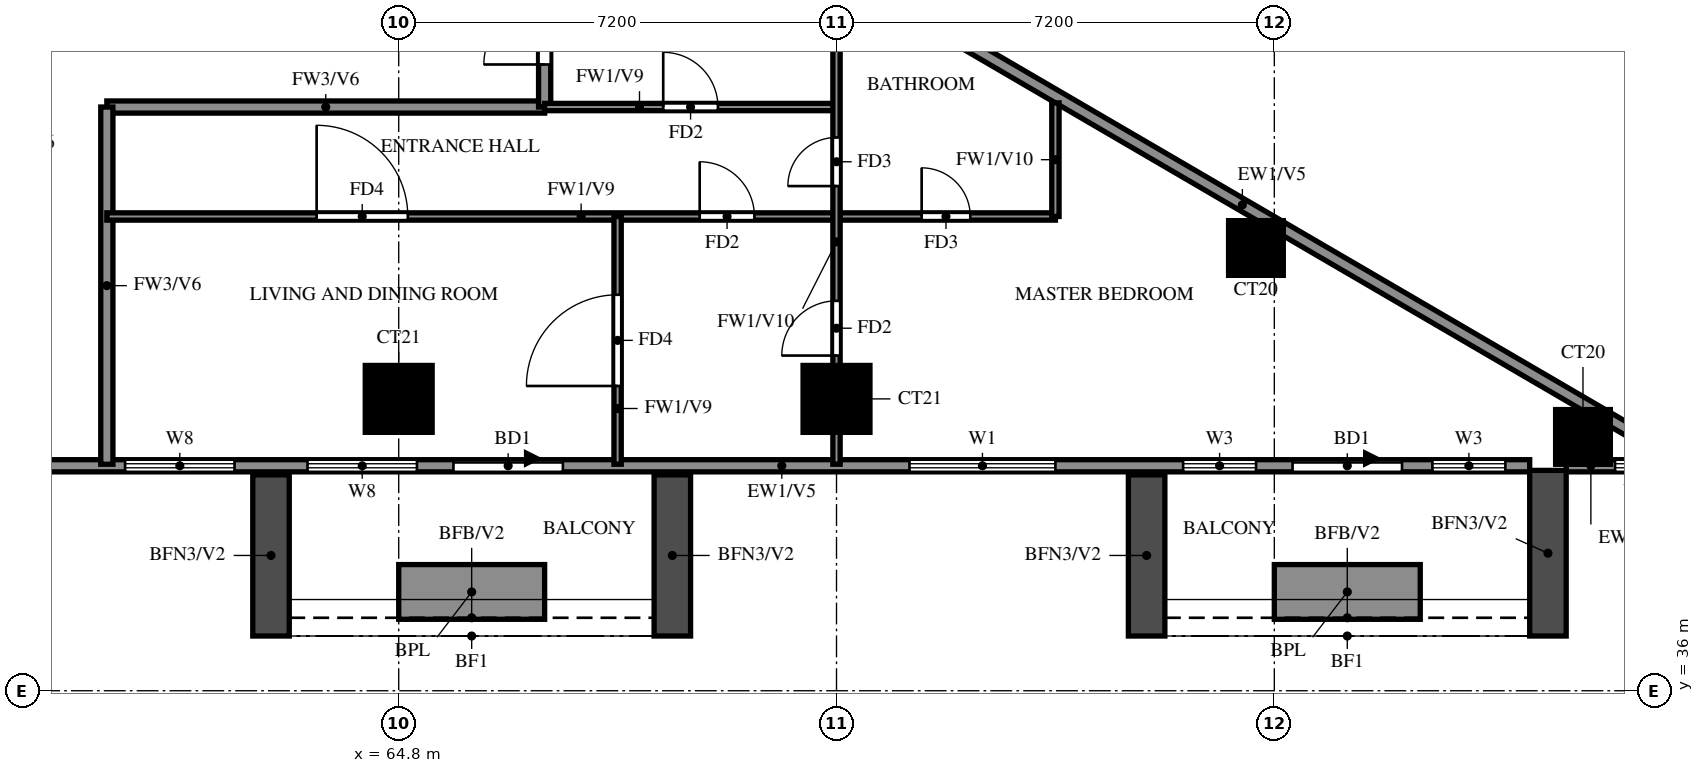
"""IFC4 building model, lengths in metres.
Left out: names, types, materials, properties, quantities, classifications, styles, units other than length and angle.
Written with IfcOpenShell. Run it as: python <this file> out.ifc"""

import sys

from ifc_helpers import new_model, si_unit, direction, frame, frame_2d, origin, origin_2d, place, context, subcontext, project, spatial, rectangle, extrude, source, transform, mapped, element, fill, save


model = new_model("IFC4")
c1 = context("Model", 3, precision=1e-05, world=origin(), true_north=direction((0.0, 1.0)))
c2 = subcontext(c1, "Body", "Model", "MODEL_VIEW")
j1 = project(units=[si_unit("LENGTHUNIT", "METRE"), si_unit("PLANEANGLEUNIT", "RADIAN")], contexts=[c1])
p1 = place(None, origin())
s1 = spatial("IfcSite", under=j1, at=p1, CompositionType="ELEMENT")
p2 = place(p1, origin())
s2 = spatial("IfcBuilding", under=s1, at=p2, CompositionType="ELEMENT")
p3 = place(p2, frame((0.0, 0.0, 134.0)))
s3 = spatial("IfcBuildingStorey", under=s2, at=p3, CompositionType="ELEMENT", Elevation=134.0)
m1 = source(origin(), c2, "Body", "SweptSolid", [
    extrude(rectangle(XDim=0.9, YDim=0.9, at=origin_2d()), origin(), (0.0, 0.0, 1.0), 3.15),
])
p4 = place(p3, frame((84.276, 40.174, 0.0), z_axis=(0.0, 0.0, 1.0), x_axis=(1.0, 0.0, 0.0)))
e1 = element("IfcColumn", 1, at=p4, inside=s3, PredefinedType="COLUMN", context=c2, shape_type="MappedRepresentation", body=[
    mapped(m1, transform((0.0, 0.0, 0.0))),
])
m2 = source(origin(), c2, "Body", "SweptSolid", [
    extrude(rectangle(XDim=1.1, YDim=1.1, at=origin_2d()), origin(), (0.0, 0.0, 1.0), 3.15),
])
for number, where, z_axis, x_axis in (
    (2, (64.8, 40.8, 0.0), (0.0, 0.0, 1.0), (1.0, 0.0, 0.0)),
    (3, (72.0, 40.8, 0.0), (0.0, 0.0, 1.0), (1.0, 0.0, 0.0)),
):
    element("IfcColumn", number, at=place(p3, frame(where, z_axis=z_axis, x_axis=x_axis)), inside=s3, PredefinedType="COLUMN", context=c2, shape_type="MappedRepresentation", body=[
        mapped(m2, transform((0.0, 0.0, 0.0))),
    ])
p5 = place(p3, frame((78.898, 43.282, 0.0), z_axis=(0.0, 0.0, 1.0), x_axis=(1.0, 0.0, 0.0)))
e4 = element("IfcColumn", 4, at=p5, inside=s3, PredefinedType="COLUMN", context=c2, shape_type="MappedRepresentation", body=[
    mapped(m1, transform((0.0, 0.0, 0.0))),
])
p6 = place(p3, frame((85.719, 39.881, 0.0), z_axis=(0.0, 0.0, 1.0), x_axis=(-0.86377618652, 0.503875678716, 0.0)))
e5 = element("IfcWall", 5, at=p6, inside=s3, PredefinedType="SOLIDWALL", context=c2, shape_type="SweptSolid", body=[
    extrude(rectangle(XDim=16.311, YDim=0.2, at=frame_2d((8.156, 0.0))), origin(), (0.0, 0.0, 1.0), 3.15),
])
p7 = place(p6, frame((13.326, 0.0, 1.5)))
e6 = element("IfcOpeningElement", 6, at=p7, cuts=e5, PredefinedType="OPENING", context=c2, shape_type="SweptSolid", body=[
    extrude(rectangle(XDim=0.9, YDim=0.9, at=frame_2d((0.45, 0.45))), frame((0.0, 0.11, 0.0), z_axis=(0.0, -1.0, 0.0), x_axis=(1.0, 0.0, 0.0)), (0.0, 0.0, 1.0), 0.22),
])
p8 = place(p3, frame((58.8, 39.7, 0.0), z_axis=(0.0, 0.0, 1.0), x_axis=(1.0, 0.0, 0.0)))
e7 = element("IfcWall", 7, at=p8, inside=s3, PredefinedType="SOLIDWALL", context=c2, shape_type="SweptSolid", body=[
    extrude(rectangle(XDim=24.6, YDim=0.2, at=frame_2d((12.3, 0.0))), origin(), (0.0, 0.0, 1.0), 3.15),
])
p9 = place(p8, frame((6.9, 0.0, 0.0)))
e8 = element("IfcOpeningElement", 8, at=p9, cuts=e7, PredefinedType="OPENING", context=c2, shape_type="SweptSolid", body=[
    extrude(rectangle(XDim=1.8, YDim=2.4, at=frame_2d((0.9, 1.2))), frame((0.0, 0.11, 0.0), z_axis=(0.0, -1.0, 0.0), x_axis=(1.0, 0.0, 0.0)), (0.0, 0.0, 1.0), 0.22),
])
p10 = place(p8, frame((20.7, 0.0, 0.0)))
e9 = element("IfcOpeningElement", 9, at=p10, cuts=e7, PredefinedType="OPENING", context=c2, shape_type="SweptSolid", body=[
    extrude(rectangle(XDim=1.8, YDim=2.4, at=frame_2d((0.9, 1.2))), frame((0.0, 0.11, 0.0), z_axis=(0.0, -1.0, 0.0), x_axis=(1.0, 0.0, 0.0)), (0.0, 0.0, 1.0), 0.22),
])
p11 = place(p8, frame((1.5, 0.0, 0.6)))
e10 = element("IfcOpeningElement", 10, at=p11, cuts=e7, PredefinedType="OPENING", context=c2, shape_type="SweptSolid", body=[
    extrude(rectangle(XDim=1.8, YDim=2.4, at=frame_2d((0.9, 1.2))), frame((0.0, 0.11, 0.0), z_axis=(0.0, -1.0, 0.0), x_axis=(1.0, 0.0, 0.0)), (0.0, 0.0, 1.0), 0.22),
])
p12 = place(p8, frame((4.5, 0.0, 0.6)))
e11 = element("IfcOpeningElement", 11, at=p12, cuts=e7, PredefinedType="OPENING", context=c2, shape_type="SweptSolid", body=[
    extrude(rectangle(XDim=1.8, YDim=2.4, at=frame_2d((0.9, 1.2))), frame((0.0, 0.11, 0.0), z_axis=(0.0, -1.0, 0.0), x_axis=(1.0, 0.0, 0.0)), (0.0, 0.0, 1.0), 0.22),
])
p13 = place(p8, frame((14.4, 0.0, 0.6)))
e12 = element("IfcOpeningElement", 12, at=p13, cuts=e7, PredefinedType="OPENING", context=c2, shape_type="SweptSolid", body=[
    extrude(rectangle(XDim=2.4, YDim=2.4, at=frame_2d((1.2, 1.2))), frame((0.0, 0.11, 0.0), z_axis=(0.0, -1.0, 0.0), x_axis=(1.0, 0.0, 0.0)), (0.0, 0.0, 1.0), 0.22),
])
p14 = place(p8, frame((18.9, 0.0, 0.6)))
e13 = element("IfcOpeningElement", 13, at=p14, cuts=e7, PredefinedType="OPENING", context=c2, shape_type="SweptSolid", body=[
    extrude(rectangle(XDim=1.2, YDim=2.4, at=frame_2d((0.6, 1.2))), frame((0.0, 0.11, 0.0), z_axis=(0.0, -1.0, 0.0), x_axis=(1.0, 0.0, 0.0)), (0.0, 0.0, 1.0), 0.22),
])
p15 = place(p8, frame((23.0, 0.0, 0.6)))
e14 = element("IfcOpeningElement", 14, at=p15, cuts=e7, PredefinedType="OPENING", context=c2, shape_type="SweptSolid", body=[
    extrude(rectangle(XDim=1.2, YDim=2.4, at=frame_2d((0.6, 1.2))), frame((0.0, 0.11, 0.0), z_axis=(0.0, -1.0, 0.0), x_axis=(1.0, 0.0, 0.0)), (0.0, 0.0, 1.0), 0.22),
])
p16 = place(p3, frame((84.0, 39.7, 0.0), z_axis=(0.0, 0.0, 1.0), x_axis=(1.0, 0.0, 0.0)))
e15 = element("IfcWall", 15, at=p16, inside=s3, PredefinedType="SOLIDWALL", context=c2, shape_type="SweptSolid", body=[
    extrude(rectangle(XDim=2.03, YDim=0.2, at=frame_2d((1.015, 0.0))), origin(), (0.0, 0.0, 1.0), 3.15),
])
p17 = place(p16, frame((0.803, 0.0, 0.6)))
e16 = element("IfcOpeningElement", 16, at=p17, cuts=e15, PredefinedType="OPENING", context=c2, shape_type="SweptSolid", body=[
    extrude(rectangle(XDim=0.9, YDim=2.4, at=frame_2d((0.45, 1.2))), frame((0.0, 0.11, 0.0), z_axis=(0.0, -1.0, 0.0), x_axis=(1.0, 0.0, 0.0)), (0.0, 0.0, 1.0), 0.22),
])
for number, where, z_axis, x_axis in (
    (17, (62.7, 39.55, 0.0), (0.0, 0.0, 1.0), (0.0, -1.0, 0.0)),
    (18, (69.3, 39.55, 0.0), (0.0, 0.0, 1.0), (0.0, -1.0, 0.0)),
):
    element("IfcWall", number, at=place(p3, frame(where, z_axis=z_axis, x_axis=x_axis)), inside=s3, PredefinedType="SOLIDWALL", context=c2, shape_type="SweptSolid", body=[
        extrude(rectangle(XDim=2.65, YDim=0.6, at=frame_2d((1.325, 0.0))), origin(), (0.0, 0.0, 1.0), 2.8),
    ])
p18 = place(p3, frame((64.8, 37.625, 0.0), z_axis=(0.0, 0.0, 1.0), x_axis=(1.0, 0.0, 0.0)))
e19 = element("IfcWall", 19, at=p18, inside=s3, PredefinedType="SOLIDWALL", context=c2, shape_type="SweptSolid", body=[
    extrude(rectangle(XDim=2.4, YDim=0.9, at=frame_2d((1.2, 0.0))), origin(), (0.0, 0.0, 1.0), 0.9),
])
p19 = place(p3, frame((77.1, 39.55, 0.0), z_axis=(0.0, 0.0, 1.0), x_axis=(0.0, -1.0, 0.0)))
e20 = element("IfcWall", 20, at=p19, inside=s3, PredefinedType="SOLIDWALL", context=c2, shape_type="SweptSolid", body=[
    extrude(rectangle(XDim=2.65, YDim=0.6, at=frame_2d((1.325, 0.0))), origin(), (0.0, 0.0, 1.0), 2.8),
])
p20 = place(p3, frame((83.7, 39.624, 0.0), z_axis=(0.0, 0.0, 1.0), x_axis=(0.0, -1.0, 0.0)))
e21 = element("IfcWall", 21, at=p20, inside=s3, PredefinedType="SOLIDWALL", context=c2, shape_type="SweptSolid", body=[
    extrude(rectangle(XDim=2.724, YDim=0.6, at=frame_2d((1.362, 0.0))), origin(), (0.0, 0.0, 1.0), 2.8),
])
p21 = place(p3, frame((79.2, 37.625, 0.0), z_axis=(0.0, 0.0, 1.0), x_axis=(1.0, 0.0, 0.0)))
e22 = element("IfcWall", 22, at=p21, inside=s3, PredefinedType="SOLIDWALL", context=c2, shape_type="SweptSolid", body=[
    extrude(rectangle(XDim=2.4, YDim=0.9, at=frame_2d((1.2, 0.0))), origin(), (0.0, 0.0, 1.0), 0.9),
])
p22 = place(p3, frame((60.0, 45.6, 0.0), z_axis=(0.0, 0.0, 1.0), x_axis=(1.0, 0.0, 0.0)))
e23 = element("IfcWall", 23, at=p22, inside=s3, PredefinedType="SOLIDWALL", context=c2, shape_type="SweptSolid", body=[
    extrude(rectangle(XDim=7.2, YDim=0.2, at=frame_2d((3.6, 0.0))), origin(), (0.0, 0.0, 1.0), 3.15),
])
p23 = place(p3, frame((60.0, 39.725, 0.0), z_axis=(0.0, 0.0, 1.0), x_axis=(0.0, 1.0, 0.0)))
e24 = element("IfcWall", 24, at=p23, inside=s3, PredefinedType="SOLIDWALL", context=c2, shape_type="SweptSolid", body=[
    extrude(rectangle(XDim=5.875, YDim=0.2, at=frame_2d((2.938, 0.0))), origin(), (0.0, 0.0, 1.0), 3.15),
])
p24 = place(p3, frame((67.2, 45.6, 0.0), z_axis=(0.0, 0.0, 1.0), x_axis=(0.0, 1.0, 0.0)))
e25 = element("IfcWall", 25, at=p24, inside=s3, PredefinedType="SOLIDWALL", context=c2, shape_type="SweptSolid", body=[
    extrude(rectangle(XDim=12.0, YDim=0.2, at=frame_2d((6.0, 0.0))), origin(), (0.0, 0.0, 1.0), 3.15),
])
p25 = place(p24, frame((10.3, 0.0, 0.0)))
e26 = element("IfcOpeningElement", 26, at=p25, cuts=e25, PredefinedType="OPENING", context=c2, shape_type="SweptSolid", body=[
    extrude(rectangle(XDim=1.0, YDim=2.1, at=frame_2d((0.5, 1.05))), frame((0.0, 0.11, 0.0), z_axis=(0.0, -1.0, 0.0), x_axis=(1.0, 0.0, 0.0)), (0.0, 0.0, 1.0), 0.22),
])
p26 = place(p24, frame((0.7, 0.0, 0.0)))
e27 = element("IfcOpeningElement", 27, at=p26, cuts=e25, PredefinedType="OPENING", context=c2, shape_type="SweptSolid", body=[
    extrude(rectangle(XDim=1.0, YDim=2.1, at=frame_2d((0.5, 1.05))), frame((0.0, 0.11, 0.0), z_axis=(0.0, -1.0, 0.0), x_axis=(1.0, 0.0, 0.0)), (0.0, 0.0, 1.0), 0.22),
])
p27 = place(p3, frame((60.0, 43.8, 0.0), z_axis=(0.0, 0.0, 1.0), x_axis=(1.0, 0.0, 0.0)))
e28 = element("IfcWall", 28, at=p27, inside=s3, PredefinedType="PARTITIONING", context=c2, shape_type="SweptSolid", body=[
    extrude(rectangle(XDim=15.6, YDim=0.12, at=frame_2d((7.8, 0.0))), origin(), (0.0, 0.0, 1.0), 3.15),
])
p28 = place(p27, frame((9.75, 0.0, 0.0)))
e29 = element("IfcOpeningElement", 29, at=p28, cuts=e28, PredefinedType="OPENING", context=c2, shape_type="SweptSolid", body=[
    extrude(rectangle(XDim=0.9, YDim=2.1, at=frame_2d((0.45, 1.05))), frame((0.0, 0.07, 0.0), z_axis=(0.0, -1.0, 0.0), x_axis=(1.0, 0.0, 0.0)), (0.0, 0.0, 1.0), 0.14),
])
p29 = place(p27, frame((3.45, 0.0, 0.0)))
e30 = element("IfcOpeningElement", 30, at=p29, cuts=e28, PredefinedType="OPENING", context=c2, shape_type="SweptSolid", body=[
    extrude(rectangle(XDim=1.5, YDim=2.1, at=frame_2d((0.75, 1.05))), frame((0.0, 0.07, 0.0), z_axis=(0.0, -1.0, 0.0), x_axis=(1.0, 0.0, 0.0)), (0.0, 0.0, 1.0), 0.14),
])
p30 = place(p27, frame((13.4, 0.0, 0.0)))
e31 = element("IfcOpeningElement", 31, at=p30, cuts=e28, PredefinedType="OPENING", context=c2, shape_type="SweptSolid", body=[
    extrude(rectangle(XDim=0.8, YDim=2.1, at=frame_2d((0.4, 1.05))), frame((0.0, 0.07, 0.0), z_axis=(0.0, -1.0, 0.0), x_axis=(1.0, 0.0, 0.0)), (0.0, 0.0, 1.0), 0.14),
])
p31 = place(p3, frame((67.2, 45.6, 0.0), z_axis=(0.0, 0.0, 1.0), x_axis=(1.0, 0.0, 0.0)))
e32 = element("IfcWall", 32, at=p31, inside=s3, PredefinedType="PARTITIONING", context=c2, shape_type="SweptSolid", body=[
    extrude(rectangle(XDim=4.8, YDim=0.12, at=frame_2d((2.4, 0.0))), origin(), (0.0, 0.0, 1.0), 3.15),
])
p32 = place(p31, frame((1.95, 0.0, 0.0)))
e33 = element("IfcOpeningElement", 33, at=p32, cuts=e32, PredefinedType="OPENING", context=c2, shape_type="SweptSolid", body=[
    extrude(rectangle(XDim=0.9, YDim=2.1, at=frame_2d((0.45, 1.05))), frame((0.0, 0.07, 0.0), z_axis=(0.0, -1.0, 0.0), x_axis=(1.0, 0.0, 0.0)), (0.0, 0.0, 1.0), 0.14),
])
p33 = place(p3, frame((68.4, 39.725, 0.0), z_axis=(0.0, 0.0, 1.0), x_axis=(0.0, 1.0, 0.0)))
e34 = element("IfcWall", 34, at=p33, inside=s3, PredefinedType="PARTITIONING", context=c2, shape_type="SweptSolid", body=[
    extrude(rectangle(XDim=4.075, YDim=0.12, at=frame_2d((2.038, 0.0))), origin(), (0.0, 0.0, 1.0), 3.15),
])
p34 = place(p33, frame((1.288, 0.0, 0.0)))
e35 = element("IfcOpeningElement", 35, at=p34, cuts=e34, PredefinedType="OPENING", context=c2, shape_type="SweptSolid", body=[
    extrude(rectangle(XDim=1.5, YDim=2.1, at=frame_2d((0.75, 1.05))), frame((0.0, 0.07, 0.0), z_axis=(0.0, -1.0, 0.0), x_axis=(1.0, 0.0, 0.0)), (0.0, 0.0, 1.0), 0.14),
])
p35 = place(p3, frame((72.0, 39.725, 0.0), z_axis=(0.0, 0.0, 1.0), x_axis=(0.0, 1.0, 0.0)))
e36 = element("IfcWall", 36, at=p35, inside=s3, PredefinedType="PARTITIONING", context=c2, shape_type="SweptSolid", body=[
    extrude(rectangle(XDim=8.13, YDim=0.12, at=frame_2d((4.065, 0.0))), origin(), (0.0, 0.0, 1.0), 2.25),
])
p36 = place(p35, frame((1.788, 0.0, 0.0)))
e37 = element("IfcOpeningElement", 37, at=p36, cuts=e36, PredefinedType="OPENING", context=c2, shape_type="SweptSolid", body=[
    extrude(rectangle(XDim=0.9, YDim=2.1, at=frame_2d((0.45, 1.05))), frame((0.0, 0.07, 0.0), z_axis=(0.0, -1.0, 0.0), x_axis=(1.0, 0.0, 0.0)), (0.0, 0.0, 1.0), 0.14),
])
p37 = place(p35, frame((4.575, 0.0, 0.0)))
e38 = element("IfcOpeningElement", 38, at=p37, cuts=e36, PredefinedType="OPENING", context=c2, shape_type="SweptSolid", body=[
    extrude(rectangle(XDim=0.8, YDim=2.1, at=frame_2d((0.4, 1.05))), frame((0.0, 0.07, 0.0), z_axis=(0.0, -1.0, 0.0), x_axis=(1.0, 0.0, 0.0)), (0.0, 0.0, 1.0), 0.14),
])
p38 = place(p3, frame((75.6, 43.8, 0.0), z_axis=(0.0, 0.0, 1.0), x_axis=(0.0, 1.0, 0.0)))
e39 = element("IfcWall", 39, at=p38, inside=s3, PredefinedType="PARTITIONING", context=c2, shape_type="SweptSolid", body=[
    extrude(rectangle(XDim=1.868, YDim=0.12, at=frame_2d((0.934, 0.0))), origin(), (0.0, 0.0, 1.0), 2.25),
])
p39 = place(p9, origin())
e40 = element("IfcDoor", 40, at=p39, inside=s3, OperationType="DOUBLE_DOOR_SLIDING", PredefinedType="DOOR", context=c2, shape_type="SweptSolid", body=[
    extrude(rectangle(XDim=1.8, YDim=2.4, at=frame_2d((0.9, 1.2))), frame((0.0, 0.025, 0.0), z_axis=(0.0, -1.0, 0.0), x_axis=(1.0, 0.0, 0.0)), (0.0, 0.0, 1.0), 0.05),
])
fill(e8, e40)
p40 = place(p10, origin())
e41 = element("IfcDoor", 41, at=p40, inside=s3, OperationType="DOUBLE_DOOR_SLIDING", PredefinedType="DOOR", context=c2, shape_type="SweptSolid", body=[
    extrude(rectangle(XDim=1.8, YDim=2.4, at=frame_2d((0.9, 1.2))), frame((0.0, 0.025, 0.0), z_axis=(0.0, -1.0, 0.0), x_axis=(1.0, 0.0, 0.0)), (0.0, 0.0, 1.0), 0.05),
])
fill(e9, e41)
p41 = place(p11, origin())
e42 = element("IfcWindow", 42, at=p41, inside=s3, PartitioningType="DOUBLE_PANEL_VERTICAL", PredefinedType="WINDOW", context=c2, shape_type="SweptSolid", body=[
    extrude(rectangle(XDim=1.8, YDim=2.4, at=frame_2d((0.9, 1.2))), frame((0.0, 0.03, 0.0), z_axis=(0.0, -1.0, 0.0), x_axis=(1.0, 0.0, 0.0)), (0.0, 0.0, 1.0), 0.06),
])
fill(e10, e42)
p42 = place(p12, origin())
e43 = element("IfcWindow", 43, at=p42, inside=s3, PartitioningType="DOUBLE_PANEL_VERTICAL", PredefinedType="WINDOW", context=c2, shape_type="SweptSolid", body=[
    extrude(rectangle(XDim=1.8, YDim=2.4, at=frame_2d((0.9, 1.2))), frame((0.0, 0.03, 0.0), z_axis=(0.0, -1.0, 0.0), x_axis=(1.0, 0.0, 0.0)), (0.0, 0.0, 1.0), 0.06),
])
fill(e11, e43)
p43 = place(p13, origin())
e44 = element("IfcWindow", 44, at=p43, inside=s3, PartitioningType="DOUBLE_PANEL_VERTICAL", PredefinedType="WINDOW", context=c2, shape_type="SweptSolid", body=[
    extrude(rectangle(XDim=2.4, YDim=2.4, at=frame_2d((1.2, 1.2))), frame((0.0, 0.03, 0.0), z_axis=(0.0, -1.0, 0.0), x_axis=(1.0, 0.0, 0.0)), (0.0, 0.0, 1.0), 0.06),
])
fill(e12, e44)
p44 = place(p14, origin())
e45 = element("IfcWindow", 45, at=p44, inside=s3, PartitioningType="SINGLE_PANEL", PredefinedType="WINDOW", context=c2, shape_type="SweptSolid", body=[
    extrude(rectangle(XDim=1.2, YDim=2.4, at=frame_2d((0.6, 1.2))), frame((0.0, 0.03, 0.0), z_axis=(0.0, -1.0, 0.0), x_axis=(1.0, 0.0, 0.0)), (0.0, 0.0, 1.0), 0.06),
])
fill(e13, e45)
p45 = place(p15, origin())
e46 = element("IfcWindow", 46, at=p45, inside=s3, PartitioningType="SINGLE_PANEL", PredefinedType="WINDOW", context=c2, shape_type="SweptSolid", body=[
    extrude(rectangle(XDim=1.2, YDim=2.4, at=frame_2d((0.6, 1.2))), frame((0.0, 0.03, 0.0), z_axis=(0.0, -1.0, 0.0), x_axis=(1.0, 0.0, 0.0)), (0.0, 0.0, 1.0), 0.06),
])
fill(e14, e46)
p46 = place(p17, origin())
e47 = element("IfcWindow", 47, at=p46, inside=s3, PartitioningType="SINGLE_PANEL", PredefinedType="WINDOW", context=c2, shape_type="SweptSolid", body=[
    extrude(rectangle(XDim=0.9, YDim=2.4, at=frame_2d((0.45, 1.2))), frame((0.0, 0.03, 0.0), z_axis=(0.0, -1.0, 0.0), x_axis=(1.0, 0.0, 0.0)), (0.0, 0.0, 1.0), 0.06),
])
fill(e16, e47)
p47 = place(p34, origin())
e48 = element("IfcDoor", 48, at=p47, inside=s3, OperationType="SINGLE_SWING_LEFT", PredefinedType="DOOR", context=c2, shape_type="SweptSolid", body=[
    extrude(rectangle(XDim=1.5, YDim=2.1, at=frame_2d((0.75, 1.05))), frame((0.0, 0.025, 0.0), z_axis=(0.0, -1.0, 0.0), x_axis=(1.0, 0.0, 0.0)), (0.0, 0.0, 1.0), 0.05),
])
fill(e35, e48)
p48 = place(p32, origin())
e49 = element("IfcDoor", 49, at=p48, inside=s3, OperationType="SINGLE_SWING_LEFT", PredefinedType="DOOR", context=c2, shape_type="SweptSolid", body=[
    extrude(rectangle(XDim=0.9, YDim=2.1, at=frame_2d((0.45, 1.05))), frame((0.0, 0.025, 0.0), z_axis=(0.0, -1.0, 0.0), x_axis=(1.0, 0.0, 0.0)), (0.0, 0.0, 1.0), 0.05),
])
fill(e33, e49)
p49 = place(p26, origin())
e50 = element("IfcDoor", 50, at=p49, inside=s3, OperationType="SINGLE_SWING_RIGHT", PredefinedType="DOOR", context=c2, shape_type="SweptSolid", body=[
    extrude(rectangle(XDim=1.0, YDim=2.1, at=frame_2d((0.5, 1.05))), frame((0.0, 0.025, 0.0), z_axis=(0.0, -1.0, 0.0), x_axis=(1.0, 0.0, 0.0)), (0.0, 0.0, 1.0), 0.05),
])
fill(e27, e50)
p50 = place(p28, origin())
e51 = element("IfcDoor", 51, at=p50, inside=s3, OperationType="SINGLE_SWING_LEFT", PredefinedType="DOOR", context=c2, shape_type="SweptSolid", body=[
    extrude(rectangle(XDim=0.9, YDim=2.1, at=frame_2d((0.45, 1.05))), frame((0.0, 0.025, 0.0), z_axis=(0.0, -1.0, 0.0), x_axis=(1.0, 0.0, 0.0)), (0.0, 0.0, 1.0), 0.05),
])
fill(e29, e51)
p51 = place(p29, origin())
e52 = element("IfcDoor", 52, at=p51, inside=s3, OperationType="SINGLE_SWING_LEFT", PredefinedType="DOOR", context=c2, shape_type="SweptSolid", body=[
    extrude(rectangle(XDim=1.5, YDim=2.1, at=frame_2d((0.75, 1.05))), frame((0.0, 0.025, 0.0), z_axis=(0.0, -1.0, 0.0), x_axis=(1.0, 0.0, 0.0)), (0.0, 0.0, 1.0), 0.05),
])
fill(e30, e52)
p52 = place(p36, origin())
e53 = element("IfcDoor", 53, at=p52, inside=s3, OperationType="SINGLE_SWING_LEFT", PredefinedType="DOOR", context=c2, shape_type="SweptSolid", body=[
    extrude(rectangle(XDim=0.9, YDim=2.1, at=frame_2d((0.45, 1.05))), frame((0.0, 0.025, 0.0), z_axis=(0.0, -1.0, 0.0), x_axis=(1.0, 0.0, 0.0)), (0.0, 0.0, 1.0), 0.05),
])
fill(e37, e53)
p53 = place(p37, origin())
e54 = element("IfcDoor", 54, at=p53, inside=s3, OperationType="SINGLE_SWING_LEFT", PredefinedType="DOOR", context=c2, shape_type="SweptSolid", body=[
    extrude(rectangle(XDim=0.8, YDim=2.1, at=frame_2d((0.4, 1.05))), frame((0.0, 0.025, 0.0), z_axis=(0.0, -1.0, 0.0), x_axis=(1.0, 0.0, 0.0)), (0.0, 0.0, 1.0), 0.05),
])
fill(e38, e54)
p54 = place(p30, origin())
e55 = element("IfcDoor", 55, at=p54, inside=s3, OperationType="SINGLE_SWING_LEFT", PredefinedType="DOOR", context=c2, shape_type="SweptSolid", body=[
    extrude(rectangle(XDim=0.8, YDim=2.1, at=frame_2d((0.4, 1.05))), frame((0.0, 0.025, 0.0), z_axis=(0.0, -1.0, 0.0), x_axis=(1.0, 0.0, 0.0)), (0.0, 0.0, 1.0), 0.05),
])
fill(e31, e55)
save(model, sys.argv[1])
